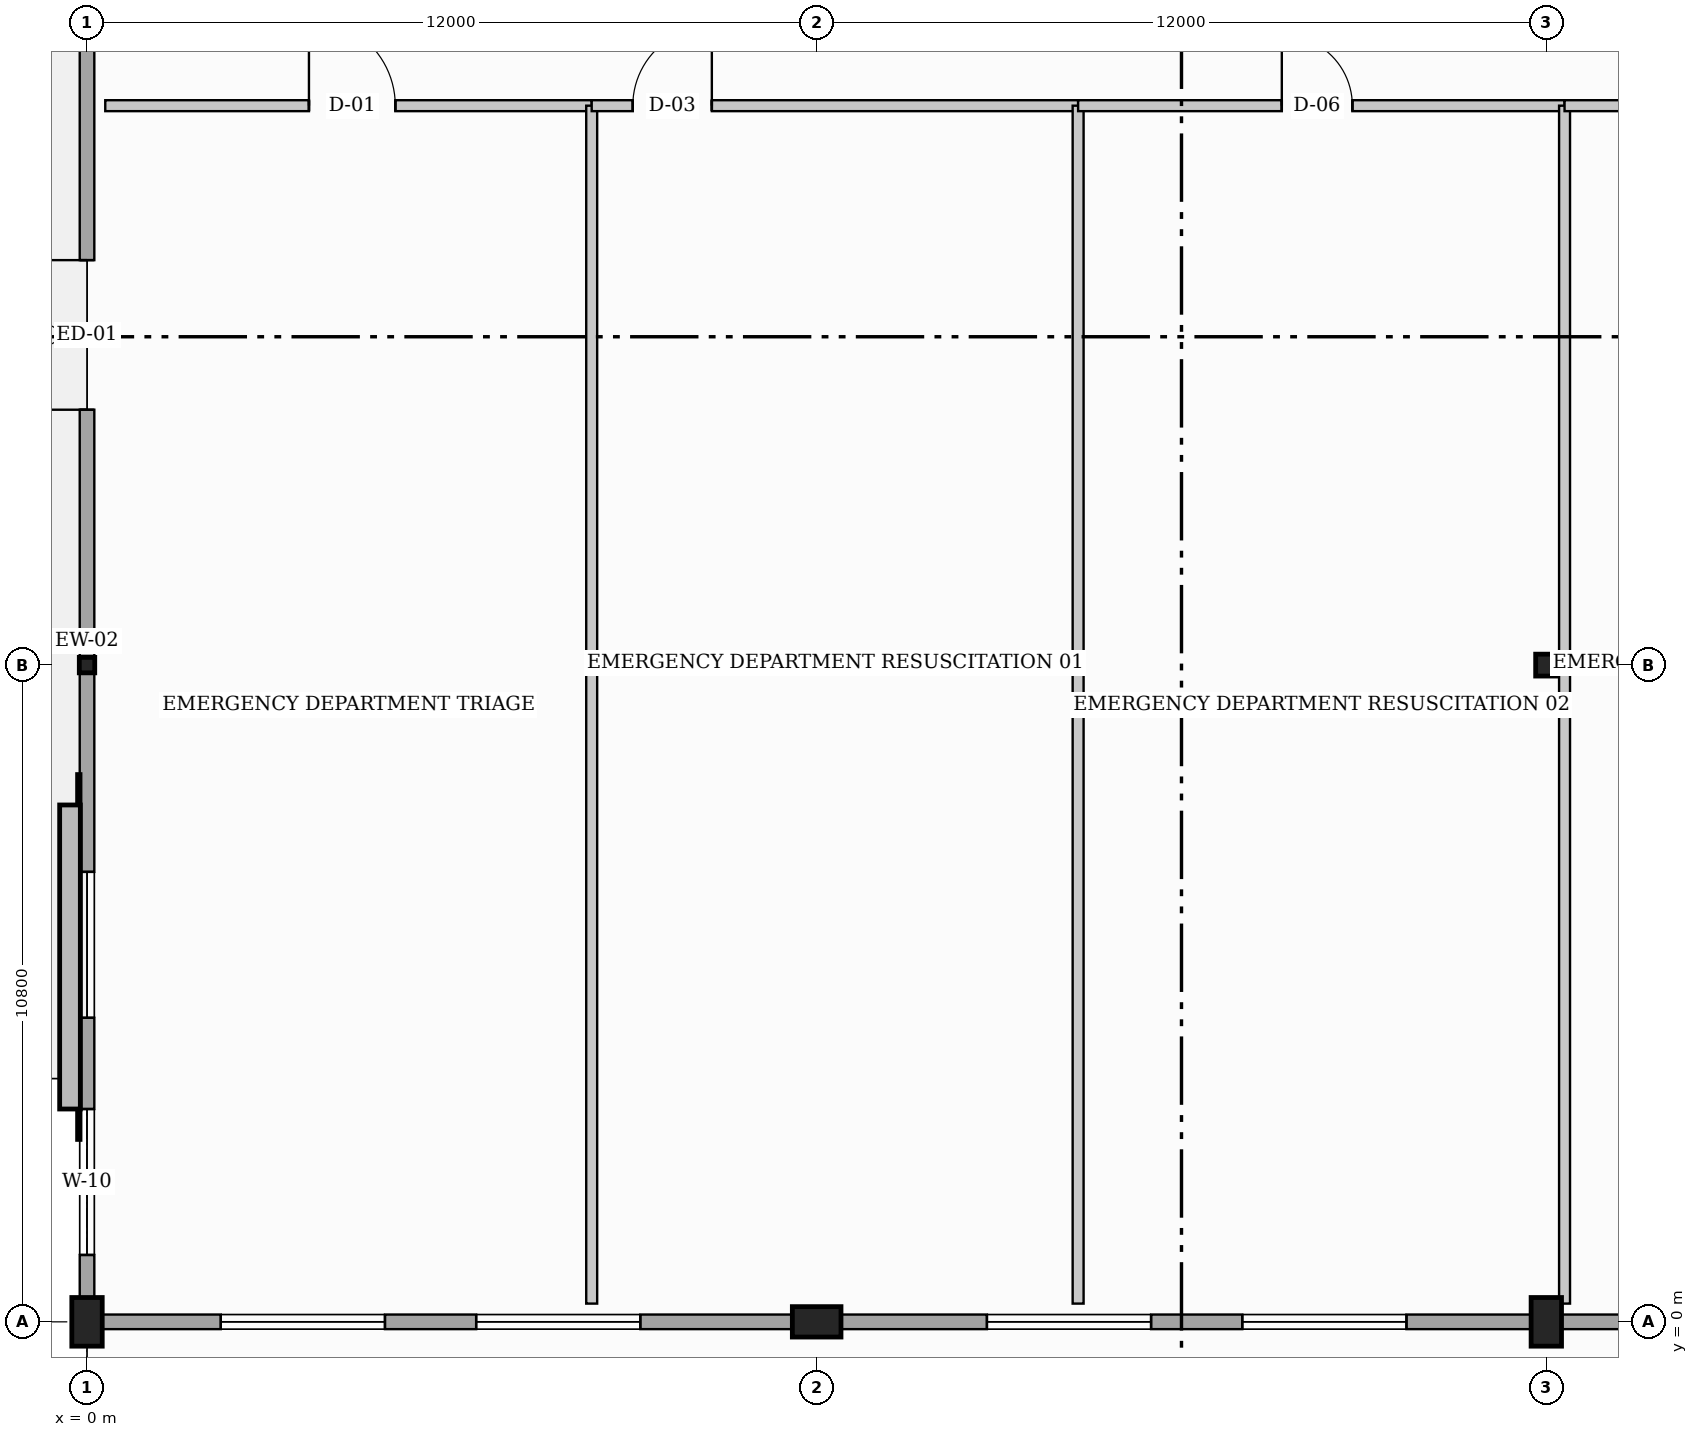
"""IFC4 building model, lengths in metres.
Left out: names, types, materials, properties, quantities, classifications, styles, units other than length and angle.
Written with IfcOpenShell. Run it as: python <this file> out.ifc"""

import sys

from ifc_helpers import new_model, si_unit, direction, frame, frame_2d, origin, origin_with_axes, origin_2d, place, context, subcontext, project, spatial, rectangle, hollow_rectangle, i_section, extrude, element, fill, save


model = new_model("IFC4")
c1 = context("Model", 3, precision=1e-05, world=origin(), true_north=direction((0.0, 1.0)))
c2 = subcontext(c1, "Body", "Model", "MODEL_VIEW")
j1 = project(units=[si_unit("LENGTHUNIT", "METRE"), si_unit("PLANEANGLEUNIT", "RADIAN")], contexts=[c1])
p1 = place(None, origin())
s1 = spatial("IfcSite", under=j1, at=p1, CompositionType="ELEMENT")
p2 = place(p1, origin())
s2 = spatial("IfcBuilding", under=s1, at=p2, CompositionType="ELEMENT")
p3 = place(p2, frame((0.0, 0.0, -4.8)))
s3 = spatial("IfcBuildingStorey", under=s2, at=p3, CompositionType="ELEMENT", Elevation=-4.8)
p4 = place(p3, origin_with_axes())
e1 = element("IfcColumn", 1, at=p4, inside=s3, PredefinedType="PILASTER", context=c2, shape_type="SweptSolid", body=[
    extrude(rectangle(XDim=0.5, YDim=0.8, at=origin_2d()), origin(), (0.0, 0.0, 1.0), 4.8),
])
p5 = place(p3, frame((0.0, 10.8, 0.0), z_axis=(0.0, 0.0, 1.0), x_axis=(1.0, 0.0, 0.0)))
e2 = element("IfcColumn", 2, at=p5, inside=s3, PredefinedType="COLUMN", context=c2, shape_type="SweptSolid", body=[
    extrude(i_section(OverallWidth=0.254, OverallDepth=0.254, WebThickness=0.009, FlangeThickness=0.014, at=origin_2d()), origin(), (0.0, 0.0, 1.0), 4.8),
])
p6 = place(p3, frame((12.0, 0.0, 0.0), z_axis=(0.0, 0.0, 1.0), x_axis=(0.0, 1.0, 0.0)))
e3 = element("IfcColumn", 3, at=p6, inside=s3, PredefinedType="PILASTER", context=c2, shape_type="SweptSolid", body=[
    extrude(rectangle(XDim=0.5, YDim=0.8, at=origin_2d()), origin(), (0.0, 0.0, 1.0), 4.8),
])
p7 = place(p3, frame((12.0, 10.8, 0.0), z_axis=(0.0, 0.0, 1.0), x_axis=(0.0, 1.0, 0.0)))
e4 = element("IfcColumn", 4, at=p7, inside=s3, PredefinedType="COLUMN", context=c2, shape_type="SweptSolid", body=[
    extrude(hollow_rectangle(XDim=0.25, YDim=0.25, WallThickness=0.012, at=origin_2d()), origin(), (0.0, 0.0, 1.0), 4.8),
])
p8 = place(p3, frame((24.0, 0.0, 0.0), z_axis=(0.0, 0.0, 1.0), x_axis=(1.0, 0.0, 0.0)))
e5 = element("IfcColumn", 5, at=p8, inside=s3, PredefinedType="PILASTER", context=c2, shape_type="SweptSolid", body=[
    extrude(rectangle(XDim=0.5, YDim=0.8, at=origin_2d()), origin(), (0.0, 0.0, 1.0), 4.8),
])
p9 = place(p3, frame((24.0, 10.8, 0.0), z_axis=(0.0, 0.0, 1.0), x_axis=(1.0, 0.0, 0.0)))
e6 = element("IfcColumn", 6, at=p9, inside=s3, PredefinedType="COLUMN", context=c2, shape_type="SweptSolid", body=[
    extrude(i_section(OverallWidth=0.35, OverallDepth=0.36, WebThickness=0.016, FlangeThickness=0.028, at=origin_2d()), origin(), (0.0, 0.0, 1.0), 4.8),
])
p10 = place(p3, frame((0.0, 0.0, 0.0), z_axis=(0.0, 0.0, 1.0), x_axis=(0.0, 1.0, 0.0)))
e7 = element("IfcWall", 7, at=p10, inside=s3, PredefinedType="STANDARD", context=c2, shape_type="SweptSolid", body=[
    extrude(rectangle(XDim=45.6, YDim=0.24, at=frame_2d((22.8, 0.0))), origin(), (0.0, 0.0, 1.0), 3.723),
])
p11 = place(p10, frame((15.0, 0.0, 0.0)))
e8 = element("IfcOpeningElement", 8, at=p11, cuts=e7, PredefinedType="OPENING", context=c2, shape_type="SweptSolid", body=[
    extrude(rectangle(XDim=2.46, YDim=2.4, at=frame_2d((1.23, 1.2))), frame((0.0, 0.13, 0.0), z_axis=(0.0, -1.0, 0.0), x_axis=(1.0, 0.0, 0.0)), (0.0, 0.0, 1.0), 0.26),
])
p12 = place(p10, frame((28.0, 0.0, 0.0)))
e9 = element("IfcOpeningElement", 9, at=p12, cuts=e7, PredefinedType="OPENING", context=c2, shape_type="SweptSolid", body=[
    extrude(rectangle(XDim=2.3, YDim=2.3, at=frame_2d((1.15, 1.15))), frame((0.0, 0.13, 0.0), z_axis=(0.0, -1.0, 0.0), x_axis=(1.0, 0.0, 0.0)), (0.0, 0.0, 1.0), 0.26),
])
p13 = place(p10, frame((1.1, 0.0, 1.0)))
e10 = element("IfcOpeningElement", 10, at=p13, cuts=e7, PredefinedType="OPENING", context=c2, shape_type="SweptSolid", body=[
    extrude(rectangle(XDim=2.4, YDim=1.8, at=frame_2d((1.2, 0.9))), frame((0.0, 0.13, 0.0), z_axis=(0.0, -1.0, 0.0), x_axis=(1.0, 0.0, 0.0)), (0.0, 0.0, 1.0), 0.26),
])
p14 = place(p10, frame((5.0, 0.0, 1.0)))
e11 = element("IfcOpeningElement", 11, at=p14, cuts=e7, PredefinedType="OPENING", context=c2, shape_type="SweptSolid", body=[
    extrude(rectangle(XDim=2.4, YDim=1.8, at=frame_2d((1.2, 0.9))), frame((0.0, 0.13, 0.0), z_axis=(0.0, -1.0, 0.0), x_axis=(1.0, 0.0, 0.0)), (0.0, 0.0, 1.0), 0.26),
])
p15 = place(p10, frame((24.5, 0.0, 1.0)))
e12 = element("IfcOpeningElement", 12, at=p15, cuts=e7, PredefinedType="OPENING", context=c2, shape_type="SweptSolid", body=[
    extrude(rectangle(XDim=2.4, YDim=1.8, at=frame_2d((1.2, 0.9))), frame((0.0, 0.13, 0.0), z_axis=(0.0, -1.0, 0.0), x_axis=(1.0, 0.0, 0.0)), (0.0, 0.0, 1.0), 0.26),
])
p16 = place(p10, frame((36.2, 0.0, 1.0)))
e13 = element("IfcOpeningElement", 13, at=p16, cuts=e7, PredefinedType="OPENING", context=c2, shape_type="SweptSolid", body=[
    extrude(rectangle(XDim=2.4, YDim=1.8, at=frame_2d((1.2, 0.9))), frame((0.0, 0.13, 0.0), z_axis=(0.0, -1.0, 0.0), x_axis=(1.0, 0.0, 0.0)), (0.0, 0.0, 1.0), 0.26),
])
p17 = place(p10, frame((40.1, 0.0, 1.0)))
e14 = element("IfcOpeningElement", 14, at=p17, cuts=e7, PredefinedType="OPENING", context=c2, shape_type="SweptSolid", body=[
    extrude(rectangle(XDim=2.4, YDim=1.8, at=frame_2d((1.2, 0.9))), frame((0.0, 0.13, 0.0), z_axis=(0.0, -1.0, 0.0), x_axis=(1.0, 0.0, 0.0)), (0.0, 0.0, 1.0), 0.26),
])
p18 = place(p3, frame((48.0, 0.0, 0.0), z_axis=(0.0, 0.0, 1.0), x_axis=(-1.0, 0.0, 0.0)))
e15 = element("IfcWall", 15, at=p18, inside=s3, PredefinedType="STANDARD", context=c2, shape_type="SweptSolid", body=[
    extrude(rectangle(XDim=48.0, YDim=0.24, at=frame_2d((24.0, 0.0))), origin(), (0.0, 0.0, 1.0), 3.813),
])
p19 = place(p18, frame((18.0, 0.0, 0.0)))
e16 = element("IfcOpeningElement", 16, at=p19, cuts=e15, PredefinedType="OPENING", context=c2, shape_type="SweptSolid", body=[
    extrude(rectangle(XDim=2.16, YDim=2.2, at=frame_2d((1.08, 1.1))), frame((0.0, 0.13, 0.0), z_axis=(0.0, -1.0, 0.0), x_axis=(1.0, 0.0, 0.0)), (0.0, 0.0, 1.0), 0.26),
])
p20 = place(p18, frame((1.1, 0.0, 1.0)))
e17 = element("IfcOpeningElement", 17, at=p20, cuts=e15, PredefinedType="OPENING", context=c2, shape_type="SweptSolid", body=[
    extrude(rectangle(XDim=2.7, YDim=1.8, at=frame_2d((1.35, 0.9))), frame((0.0, 0.13, 0.0), z_axis=(0.0, -1.0, 0.0), x_axis=(1.0, 0.0, 0.0)), (0.0, 0.0, 1.0), 0.26),
])
p21 = place(p18, frame((5.3, 0.0, 1.0)))
e18 = element("IfcOpeningElement", 18, at=p21, cuts=e15, PredefinedType="OPENING", context=c2, shape_type="SweptSolid", body=[
    extrude(rectangle(XDim=2.7, YDim=1.8, at=frame_2d((1.35, 0.9))), frame((0.0, 0.13, 0.0), z_axis=(0.0, -1.0, 0.0), x_axis=(1.0, 0.0, 0.0)), (0.0, 0.0, 1.0), 0.26),
])
p22 = place(p18, frame((13.7, 0.0, 1.0)))
e19 = element("IfcOpeningElement", 19, at=p22, cuts=e15, PredefinedType="OPENING", context=c2, shape_type="SweptSolid", body=[
    extrude(rectangle(XDim=2.7, YDim=1.8, at=frame_2d((1.35, 0.9))), frame((0.0, 0.13, 0.0), z_axis=(0.0, -1.0, 0.0), x_axis=(1.0, 0.0, 0.0)), (0.0, 0.0, 1.0), 0.26),
])
p23 = place(p18, frame((26.3, 0.0, 1.0)))
e20 = element("IfcOpeningElement", 20, at=p23, cuts=e15, PredefinedType="OPENING", context=c2, shape_type="SweptSolid", body=[
    extrude(rectangle(XDim=2.7, YDim=1.8, at=frame_2d((1.35, 0.9))), frame((0.0, 0.13, 0.0), z_axis=(0.0, -1.0, 0.0), x_axis=(1.0, 0.0, 0.0)), (0.0, 0.0, 1.0), 0.26),
])
p24 = place(p18, frame((30.5, 0.0, 1.0)))
e21 = element("IfcOpeningElement", 21, at=p24, cuts=e15, PredefinedType="OPENING", context=c2, shape_type="SweptSolid", body=[
    extrude(rectangle(XDim=2.7, YDim=1.8, at=frame_2d((1.35, 0.9))), frame((0.0, 0.13, 0.0), z_axis=(0.0, -1.0, 0.0), x_axis=(1.0, 0.0, 0.0)), (0.0, 0.0, 1.0), 0.26),
])
p25 = place(p18, frame((38.9, 0.0, 1.0)))
e22 = element("IfcOpeningElement", 22, at=p25, cuts=e15, PredefinedType="OPENING", context=c2, shape_type="SweptSolid", body=[
    extrude(rectangle(XDim=2.7, YDim=1.8, at=frame_2d((1.35, 0.9))), frame((0.0, 0.13, 0.0), z_axis=(0.0, -1.0, 0.0), x_axis=(1.0, 0.0, 0.0)), (0.0, 0.0, 1.0), 0.26),
])
p26 = place(p18, frame((43.1, 0.0, 1.0)))
e23 = element("IfcOpeningElement", 23, at=p26, cuts=e15, PredefinedType="OPENING", context=c2, shape_type="SweptSolid", body=[
    extrude(rectangle(XDim=2.7, YDim=1.8, at=frame_2d((1.35, 0.9))), frame((0.0, 0.13, 0.0), z_axis=(0.0, -1.0, 0.0), x_axis=(1.0, 0.0, 0.0)), (0.0, 0.0, 1.0), 0.26),
])
p27 = place(p3, frame((0.3, 20.0, 0.0), z_axis=(0.0, 0.0, 1.0), x_axis=(1.0, 0.0, 0.0)))
e24 = element("IfcWall", 24, at=p27, inside=s3, PredefinedType="PARTITIONING", context=c2, shape_type="SweptSolid", body=[
    extrude(rectangle(XDim=8.0, YDim=0.18, at=frame_2d((4.0, 0.0))), origin(), (0.0, 0.0, 1.0), 4.012),
])
p28 = place(p27, frame((3.35, 0.0, 0.0)))
e25 = element("IfcOpeningElement", 25, at=p28, cuts=e24, PredefinedType="OPENING", context=c2, shape_type="SweptSolid", body=[
    extrude(rectangle(XDim=1.42, YDim=2.22, at=frame_2d((0.71, 1.11))), frame((0.0, 0.1, 0.0), z_axis=(0.0, -1.0, 0.0), x_axis=(1.0, 0.0, 0.0)), (0.0, 0.0, 1.0), 0.2),
])
p29 = place(p3, frame((8.3, 0.3, 0.0), z_axis=(0.0, 0.0, 1.0), x_axis=(0.0, 1.0, 0.0)))
e26 = element("IfcWall", 26, at=p29, inside=s3, PredefinedType="PARTITIONING", context=c2, shape_type="SweptSolid", body=[
    extrude(rectangle(XDim=19.7, YDim=0.18, at=frame_2d((9.85, 0.0))), origin(), (0.0, 0.0, 1.0), 3.723),
])
p30 = place(p3, frame((8.3, 20.0, 0.0), z_axis=(0.0, 0.0, 1.0), x_axis=(1.0, 0.0, 0.0)))
e27 = element("IfcWall", 27, at=p30, inside=s3, PredefinedType="PARTITIONING", context=c2, shape_type="SweptSolid", body=[
    extrude(rectangle(XDim=8.0, YDim=0.18, at=frame_2d((4.0, 0.0))), origin(), (0.0, 0.0, 1.0), 3.882),
])
p31 = place(p30, frame((0.676, 0.0, 0.0)))
e28 = element("IfcOpeningElement", 28, at=p31, cuts=e27, PredefinedType="OPENING", context=c2, shape_type="SweptSolid", body=[
    extrude(rectangle(XDim=1.3, YDim=2.16, at=frame_2d((0.65, 1.08))), frame((0.0, 0.1, 0.0), z_axis=(0.0, -1.0, 0.0), x_axis=(1.0, 0.0, 0.0)), (0.0, 0.0, 1.0), 0.2),
])
p32 = place(p3, frame((16.3, 0.3, 0.0), z_axis=(0.0, 0.0, 1.0), x_axis=(0.0, 1.0, 0.0)))
e29 = element("IfcWall", 29, at=p32, inside=s3, PredefinedType="PARTITIONING", context=c2, shape_type="SweptSolid", body=[
    extrude(rectangle(XDim=19.7, YDim=0.18, at=frame_2d((9.85, 0.0))), origin(), (0.0, 0.0, 1.0), 3.803),
])
p33 = place(p3, frame((16.3, 20.0, 0.0), z_axis=(0.0, 0.0, 1.0), x_axis=(1.0, 0.0, 0.0)))
e30 = element("IfcWall", 30, at=p33, inside=s3, PredefinedType="PARTITIONING", context=c2, shape_type="SweptSolid", body=[
    extrude(rectangle(XDim=8.0, YDim=0.18, at=frame_2d((4.0, 0.0))), origin(), (0.0, 0.0, 1.0), 3.887),
])
p34 = place(p33, frame((3.35, 0.0, 0.0)))
e31 = element("IfcOpeningElement", 31, at=p34, cuts=e30, PredefinedType="OPENING", context=c2, shape_type="SweptSolid", body=[
    extrude(rectangle(XDim=1.16, YDim=2.1, at=frame_2d((0.58, 1.05))), frame((0.0, 0.1, 0.0), z_axis=(0.0, -1.0, 0.0), x_axis=(1.0, 0.0, 0.0)), (0.0, 0.0, 1.0), 0.2),
])
p35 = place(p3, frame((24.3, 0.3, 0.0), z_axis=(0.0, 0.0, 1.0), x_axis=(0.0, 1.0, 0.0)))
e32 = element("IfcWall", 32, at=p35, inside=s3, PredefinedType="PARTITIONING", context=c2, shape_type="SweptSolid", body=[
    extrude(rectangle(XDim=19.7, YDim=0.18, at=frame_2d((9.85, 0.0))), origin(), (0.0, 0.0, 1.0), 3.803),
])
p36 = place(p3, frame((24.3, 20.0, 0.0), z_axis=(0.0, 0.0, 1.0), x_axis=(1.0, 0.0, 0.0)))
e33 = element("IfcWall", 33, at=p36, inside=s3, PredefinedType="PARTITIONING", context=c2, shape_type="SweptSolid", body=[
    extrude(rectangle(XDim=8.0, YDim=0.18, at=frame_2d((4.0, 0.0))), origin(), (0.0, 0.0, 1.0), 3.887),
])
p37 = place(p36, frame((3.35, 0.0, 0.0)))
e34 = element("IfcOpeningElement", 34, at=p37, cuts=e33, PredefinedType="OPENING", context=c2, shape_type="SweptSolid", body=[
    extrude(rectangle(XDim=1.64, YDim=2.2, at=frame_2d((0.82, 1.1))), frame((0.0, 0.1, 0.0), z_axis=(0.0, -1.0, 0.0), x_axis=(1.0, 0.0, 0.0)), (0.0, 0.0, 1.0), 0.2),
])
p38 = place(p11, origin())
e35 = element("IfcDoor", 35, at=p38, inside=s3, OperationType="DOUBLE_DOOR_SINGLE_SWING", PredefinedType="DOOR", context=c2, shape_type="SweptSolid", body=[
    extrude(rectangle(XDim=2.46, YDim=2.4, at=frame_2d((1.23, 1.2))), frame((0.0, 0.025, 0.0), z_axis=(0.0, -1.0, 0.0), x_axis=(1.0, 0.0, 0.0)), (0.0, 0.0, 1.0), 0.05),
])
fill(e8, e35)
p39 = place(p13, origin())
e36 = element("IfcWindow", 36, at=p39, inside=s3, PartitioningType="TRIPLE_PANEL_VERTICAL", PredefinedType="WINDOW", context=c2, shape_type="SweptSolid", body=[
    extrude(rectangle(XDim=2.4, YDim=1.8, at=frame_2d((1.2, 0.9))), frame((0.0, 0.03, 0.0), z_axis=(0.0, -1.0, 0.0), x_axis=(1.0, 0.0, 0.0)), (0.0, 0.0, 1.0), 0.06),
])
fill(e10, e36)
p40 = place(p14, origin())
e37 = element("IfcWindow", 37, at=p40, inside=s3, PartitioningType="TRIPLE_PANEL_VERTICAL", PredefinedType="WINDOW", context=c2, shape_type="SweptSolid", body=[
    extrude(rectangle(XDim=2.4, YDim=1.8, at=frame_2d((1.2, 0.9))), frame((0.0, 0.03, 0.0), z_axis=(0.0, -1.0, 0.0), x_axis=(1.0, 0.0, 0.0)), (0.0, 0.0, 1.0), 0.06),
])
fill(e11, e37)
p41 = place(p23, origin())
e38 = element("IfcWindow", 38, at=p41, inside=s3, PartitioningType="TRIPLE_PANEL_VERTICAL", PredefinedType="WINDOW", context=c2, shape_type="SweptSolid", body=[
    extrude(rectangle(XDim=2.7, YDim=1.8, at=frame_2d((1.35, 0.9))), frame((0.0, 0.03, 0.0), z_axis=(0.0, -1.0, 0.0), x_axis=(1.0, 0.0, 0.0)), (0.0, 0.0, 1.0), 0.06),
])
fill(e20, e38)
p42 = place(p24, origin())
e39 = element("IfcWindow", 39, at=p42, inside=s3, PartitioningType="TRIPLE_PANEL_VERTICAL", PredefinedType="WINDOW", context=c2, shape_type="SweptSolid", body=[
    extrude(rectangle(XDim=2.7, YDim=1.8, at=frame_2d((1.35, 0.9))), frame((0.0, 0.03, 0.0), z_axis=(0.0, -1.0, 0.0), x_axis=(1.0, 0.0, 0.0)), (0.0, 0.0, 1.0), 0.06),
])
fill(e21, e39)
p43 = place(p25, origin())
e40 = element("IfcWindow", 40, at=p43, inside=s3, PartitioningType="TRIPLE_PANEL_VERTICAL", PredefinedType="WINDOW", context=c2, shape_type="SweptSolid", body=[
    extrude(rectangle(XDim=2.7, YDim=1.8, at=frame_2d((1.35, 0.9))), frame((0.0, 0.03, 0.0), z_axis=(0.0, -1.0, 0.0), x_axis=(1.0, 0.0, 0.0)), (0.0, 0.0, 1.0), 0.06),
])
fill(e22, e40)
p44 = place(p26, origin())
e41 = element("IfcWindow", 41, at=p44, inside=s3, PartitioningType="TRIPLE_PANEL_VERTICAL", PredefinedType="WINDOW", context=c2, shape_type="SweptSolid", body=[
    extrude(rectangle(XDim=2.7, YDim=1.8, at=frame_2d((1.35, 0.9))), frame((0.0, 0.03, 0.0), z_axis=(0.0, -1.0, 0.0), x_axis=(1.0, 0.0, 0.0)), (0.0, 0.0, 1.0), 0.06),
])
fill(e23, e41)
p45 = place(p28, origin())
e42 = element("IfcDoor", 42, at=p45, inside=s3, OperationType="SINGLE_SWING_LEFT", PredefinedType="DOOR", context=c2, shape_type="SweptSolid", body=[
    extrude(rectangle(XDim=1.42, YDim=2.22, at=frame_2d((0.71, 1.11))), frame((0.0, 0.025, 0.0), z_axis=(0.0, -1.0, 0.0), x_axis=(1.0, 0.0, 0.0)), (0.0, 0.0, 1.0), 0.05),
])
fill(e25, e42)
p46 = place(p31, origin())
e43 = element("IfcDoor", 43, at=p46, inside=s3, OperationType="SINGLE_SWING_RIGHT", PredefinedType="DOOR", context=c2, shape_type="SweptSolid", body=[
    extrude(rectangle(XDim=1.3, YDim=2.16, at=frame_2d((0.65, 1.08))), frame((0.0, 0.025, 0.0), z_axis=(0.0, -1.0, 0.0), x_axis=(1.0, 0.0, 0.0)), (0.0, 0.0, 1.0), 0.05),
])
fill(e28, e43)
p47 = place(p34, origin())
e44 = element("IfcDoor", 44, at=p47, inside=s3, OperationType="SINGLE_SWING_LEFT", PredefinedType="DOOR", context=c2, shape_type="SweptSolid", body=[
    extrude(rectangle(XDim=1.16, YDim=2.1, at=frame_2d((0.58, 1.05))), frame((0.0, 0.025, 0.0), z_axis=(0.0, -1.0, 0.0), x_axis=(1.0, 0.0, 0.0)), (0.0, 0.0, 1.0), 0.05),
])
fill(e31, e44)
save(model, sys.argv[1])
